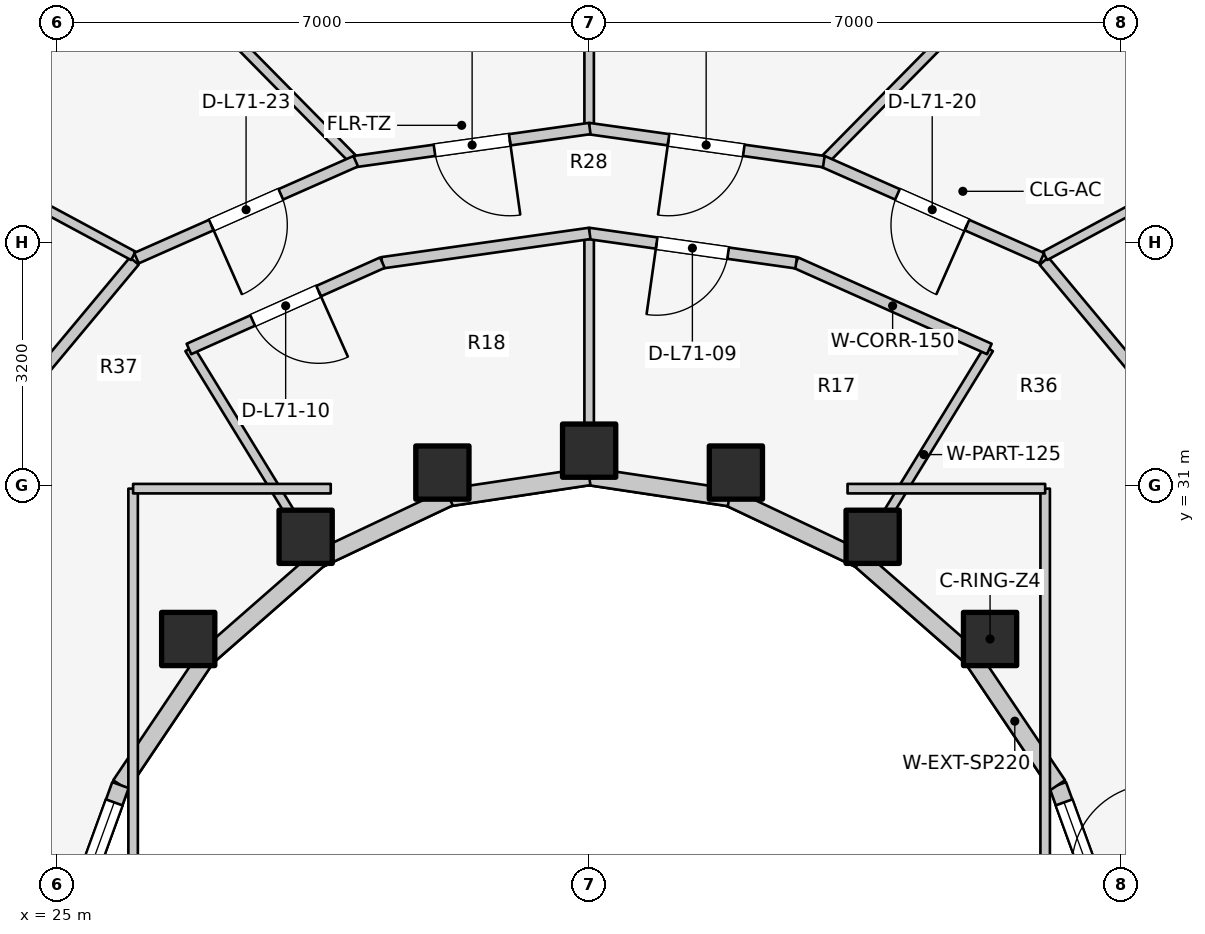
"""IFC4 building model, lengths in metres.
Left out: names, types, materials, properties, quantities, classifications, styles, units other than length and angle.
Written with IfcOpenShell. Run it as: python <this file> out.ifc"""

import sys

from ifc_helpers import new_model, si_unit, direction, frame, frame_2d, origin, origin_2d, place, context, subcontext, project, spatial, rectangle, extrude, element, fill, save


model = new_model("IFC4")
c1 = context("Model", 3, precision=1e-05, world=origin(), true_north=direction((0.0, 1.0)))
c2 = subcontext(c1, "Body", "Model", "MODEL_VIEW")
j1 = project(units=[si_unit("LENGTHUNIT", "METRE"), si_unit("PLANEANGLEUNIT", "RADIAN")], contexts=[c1])
p1 = place(None, origin())
s1 = spatial("IfcSite", under=j1, at=p1, CompositionType="ELEMENT")
p2 = place(p1, origin())
s2 = spatial("IfcBuilding", under=s1, at=p2, CompositionType="ELEMENT")
p3 = place(p2, frame((0.0, 0.0, 232.6)))
s3 = spatial("IfcBuildingStorey", under=s2, at=p3, CompositionType="ELEMENT", Elevation=232.6)
for number, where, z_axis, x_axis in (
    (1, (37.275, 28.982, 0.0), (0.0, 0.0, 1.0), (1.0, 0.0, 0.0)),
    (2, (35.73, 30.327, 0.0), (0.0, 0.0, 1.0), (1.0, 0.0, 0.0)),
    (3, (33.931, 31.172, 0.0), (0.0, 0.0, 1.0), (1.0, 0.0, 0.0)),
    (4, (32.0, 31.46, 0.0), (0.0, 0.0, 1.0), (1.0, 0.0, 0.0)),
    (5, (30.069, 31.172, 0.0), (0.0, 0.0, 1.0), (1.0, 0.0, 0.0)),
    (6, (28.27, 30.327, 0.0), (0.0, 0.0, 1.0), (1.0, 0.0, 0.0)),
    (7, (26.725, 28.982, 0.0), (0.0, 0.0, 1.0), (1.0, 0.0, 0.0)),
):
    element("IfcColumn", number, at=place(p3, frame(where, z_axis=z_axis, x_axis=x_axis)), inside=s3, PredefinedType="COLUMN", context=c2, shape_type="SweptSolid", body=[
        extrude(rectangle(XDim=0.7, YDim=0.7, at=origin_2d()), origin(), (0.0, 0.0, 1.0), 3.1),
    ])
p4 = place(p3, frame((38.877, 25.102, 0.0), z_axis=(0.0, 0.0, 1.0), x_axis=(-0.341423187295, 0.93990968033, 0.0)))
e8 = element("IfcWall", 8, at=p4, inside=s3, PredefinedType="STANDARD", context=c2, shape_type="SweptSolid", body=[
    extrude(rectangle(XDim=2.084, YDim=0.23, at=frame_2d((1.042, 0.0))), origin(), (0.0, 0.0, 1.0), 2.84),
])
p5 = place(p4, frame((0.242, 0.0, 0.85)))
e9 = element("IfcOpeningElement", 9, at=p5, cuts=e8, PredefinedType="OPENING", context=c2, shape_type="SweptSolid", body=[
    extrude(rectangle(XDim=1.6, YDim=1.65, at=frame_2d((0.8, 0.825))), frame((0.0, 0.125, 0.0), z_axis=(0.0, -1.0, 0.0), x_axis=(1.0, 0.0, 0.0)), (0.0, 0.0, 1.0), 0.25),
])
p6 = place(p3, frame((38.166, 27.06, 0.0), z_axis=(0.0, 0.0, 1.0), x_axis=(-0.558197800898, 0.829707909492, 0.0)))
e10 = element("IfcWall", 10, at=p6, inside=s3, PredefinedType="STANDARD", context=c2, shape_type="SweptSolid", body=[
    extrude(rectangle(XDim=2.027, YDim=0.23, at=frame_2d((1.013, 0.0))), origin(), (0.0, 0.0, 1.0), 2.16),
])
p7 = place(p3, frame((37.035, 28.742, 0.0), z_axis=(0.0, 0.0, 1.0), x_axis=(-0.752576694707, 0.658504607869, 0.0)))
e11 = element("IfcWall", 11, at=p7, inside=s3, PredefinedType="STANDARD", context=c2, shape_type="SweptSolid", body=[
    extrude(rectangle(XDim=1.959, YDim=0.23, at=frame_2d((0.98, 0.0))), origin(), (0.0, 0.0, 1.0), 2.16),
])
p8 = place(p3, frame((35.56, 30.032, 0.0), z_axis=(0.0, 0.0, 1.0), x_axis=(-0.904179699603, 0.427152280606, 0.0)))
e12 = element("IfcWall", 12, at=p8, inside=s3, PredefinedType="STANDARD", context=c2, shape_type="SweptSolid", body=[
    extrude(rectangle(XDim=1.899, YDim=0.23, at=frame_2d((0.95, 0.0))), origin(), (0.0, 0.0, 1.0), 2.16),
])
for number, where, z_axis, x_axis in (
    (13, (33.843, 30.843, 0.0), (0.0, 0.0, 1.0), (-0.989, 0.149, 0.0)),
    (14, (32.0, 31.12, 0.0), (0.0, 0.0, 1.0), (-0.989, -0.149, 0.0)),
):
    element("IfcWall", number, at=place(p3, frame(where, z_axis=z_axis, x_axis=x_axis)), inside=s3, PredefinedType="STANDARD", context=c2, shape_type="SweptSolid", body=[
        extrude(rectangle(XDim=1.864, YDim=0.23, at=frame_2d((0.932, 0.0))), origin(), (0.0, 0.0, 1.0), 2.16),
    ])
p9 = place(p3, frame((30.157, 30.843, 0.0), z_axis=(0.0, 0.0, 1.0), x_axis=(-0.904179699603, -0.427152280606, 0.0)))
e15 = element("IfcWall", 15, at=p9, inside=s3, PredefinedType="STANDARD", context=c2, shape_type="SweptSolid", body=[
    extrude(rectangle(XDim=1.899, YDim=0.23, at=frame_2d((0.95, 0.0))), origin(), (0.0, 0.0, 1.0), 2.16),
])
p10 = place(p3, frame((28.44, 30.032, 0.0), z_axis=(0.0, 0.0, 1.0), x_axis=(-0.752576694707, -0.658504607869, 0.0)))
e16 = element("IfcWall", 16, at=p10, inside=s3, PredefinedType="STANDARD", context=c2, shape_type="SweptSolid", body=[
    extrude(rectangle(XDim=1.959, YDim=0.23, at=frame_2d((0.98, 0.0))), origin(), (0.0, 0.0, 1.0), 2.16),
])
p11 = place(p3, frame((26.965, 28.742, 0.0), z_axis=(0.0, 0.0, 1.0), x_axis=(-0.558197800898, -0.829707909492, 0.0)))
e17 = element("IfcWall", 17, at=p11, inside=s3, PredefinedType="STANDARD", context=c2, shape_type="SweptSolid", body=[
    extrude(rectangle(XDim=2.027, YDim=0.23, at=frame_2d((1.013, 0.0))), origin(), (0.0, 0.0, 1.0), 2.16),
])
p12 = place(p3, frame((25.834, 27.06, 0.0), z_axis=(0.0, 0.0, 1.0), x_axis=(-0.341423187295, -0.93990968033, 0.0)))
e18 = element("IfcWall", 18, at=p12, inside=s3, PredefinedType="STANDARD", context=c2, shape_type="SweptSolid", body=[
    extrude(rectangle(XDim=2.084, YDim=0.23, at=frame_2d((1.042, 0.0))), origin(), (0.0, 0.0, 1.0), 2.84),
])
p13 = place(p12, frame((0.242, 0.0, 0.85)))
e19 = element("IfcOpeningElement", 19, at=p13, cuts=e18, PredefinedType="OPENING", context=c2, shape_type="SweptSolid", body=[
    extrude(rectangle(XDim=1.6, YDim=1.65, at=frame_2d((0.8, 0.825))), frame((0.0, 0.125, 0.0), z_axis=(0.0, -1.0, 0.0), x_axis=(1.0, 0.0, 0.0)), (0.0, 0.0, 1.0), 0.25),
])
p14 = place(p3, frame((35.55, 30.015, 0.0), z_axis=(0.0, 0.0, 1.0), x_axis=(0.522763432117, 0.852477796802, 0.0)))
e20 = element("IfcWall", 20, at=p14, inside=s3, PredefinedType="PARTITIONING", context=c2, shape_type="SweptSolid", body=[
    extrude(rectangle(XDim=3.269, YDim=0.125, at=frame_2d((1.635, 0.0))), origin(), (0.0, 0.0, 1.0), 2.376),
])
p15 = place(p3, frame((32.0, 31.1, 0.0), z_axis=(0.0, 0.0, 1.0), x_axis=(0.0, 1.0, 0.0)))
e21 = element("IfcWall", 21, at=p15, inside=s3, PredefinedType="PARTITIONING", context=c2, shape_type="SweptSolid", body=[
    extrude(rectangle(XDim=3.218, YDim=0.125, at=frame_2d((1.609, 0.0))), origin(), (0.0, 0.0, 1.0), 2.376),
])
p16 = place(p3, frame((28.45, 30.015, 0.0), z_axis=(0.0, 0.0, 1.0), x_axis=(-0.522763432117, 0.852477796802, 0.0)))
e22 = element("IfcWall", 22, at=p16, inside=s3, PredefinedType="PARTITIONING", context=c2, shape_type="SweptSolid", body=[
    extrude(rectangle(XDim=3.269, YDim=0.125, at=frame_2d((1.635, 0.0))), origin(), (0.0, 0.0, 1.0), 2.376),
])
p17 = place(p3, frame((37.265, 32.798, 0.0), z_axis=(0.0, 0.0, 1.0), x_axis=(-0.913254317828, 0.407389924971, 0.0)))
e23 = element("IfcWall", 23, at=p17, inside=s3, PredefinedType="PARTITIONING", context=c2, shape_type="SweptSolid", body=[
    extrude(rectangle(XDim=2.787, YDim=0.15, at=frame_2d((1.393, 0.0))), origin(), (0.0, 0.0, 1.0), 2.376),
])
p18 = place(p3, frame((34.724, 33.932, 0.0), z_axis=(0.0, 0.0, 1.0), x_axis=(-0.990150268487, 0.140008734782, 0.0)))
e24 = element("IfcWall", 24, at=p18, inside=s3, PredefinedType="PARTITIONING", context=c2, shape_type="SweptSolid", body=[
    extrude(rectangle(XDim=2.759, YDim=0.15, at=frame_2d((1.379, 0.0))), origin(), (0.0, 0.0, 1.0), 2.376),
])
p19 = place(p18, frame((0.904, 0.0, 0.0)))
e25 = element("IfcOpeningElement", 25, at=p19, cuts=e24, PredefinedType="OPENING", context=c2, shape_type="SweptSolid", body=[
    extrude(rectangle(XDim=0.95, YDim=2.1, at=frame_2d((0.475, 1.05))), frame((0.0, 0.085, 0.0), z_axis=(0.0, -1.0, 0.0), x_axis=(1.0, 0.0, 0.0)), (0.0, 0.0, 1.0), 0.17),
])
p20 = place(p3, frame((32.007, 34.318, 0.0), z_axis=(0.0, 0.0, 1.0), x_axis=(-0.990150268487, -0.140008734782, 0.0)))
e26 = element("IfcWall", 26, at=p20, inside=s3, PredefinedType="PARTITIONING", context=c2, shape_type="SweptSolid", body=[
    extrude(rectangle(XDim=2.759, YDim=0.15, at=frame_2d((1.379, 0.0))), origin(), (0.0, 0.0, 1.0), 2.376),
])
p21 = place(p3, frame((29.28, 33.933, 0.0), z_axis=(0.0, 0.0, 1.0), x_axis=(-0.913254317828, -0.407389924971, 0.0)))
e27 = element("IfcWall", 27, at=p21, inside=s3, PredefinedType="PARTITIONING", context=c2, shape_type="SweptSolid", body=[
    extrude(rectangle(XDim=2.787, YDim=0.15, at=frame_2d((1.393, 0.0))), origin(), (0.0, 0.0, 1.0), 2.376),
])
p22 = place(p21, frame((0.918, 0.0, 0.0)))
e28 = element("IfcOpeningElement", 28, at=p22, cuts=e27, PredefinedType="OPENING", context=c2, shape_type="SweptSolid", body=[
    extrude(rectangle(XDim=0.95, YDim=2.1, at=frame_2d((0.475, 1.05))), frame((0.0, 0.085, 0.0), z_axis=(0.0, -1.0, 0.0), x_axis=(1.0, 0.0, 0.0)), (0.0, 0.0, 1.0), 0.17),
])
p23 = place(p3, frame((26.0, 25.8, 0.0), z_axis=(0.0, 0.0, 1.0), x_axis=(0.0, 1.0, 0.0)))
e29 = element("IfcWall", 29, at=p23, inside=s3, PredefinedType="PARTITIONING", context=c2, shape_type="SweptSolid", body=[
    extrude(rectangle(XDim=5.16, YDim=0.125, at=frame_2d((2.58, 0.0))), origin(), (0.0, 0.0, 1.0), 2.232),
])
p24 = place(p3, frame((26.0, 30.96, 0.0), z_axis=(0.0, 0.0, 1.0), x_axis=(1.0, 0.0, 0.0)))
e30 = element("IfcWall", 30, at=p24, inside=s3, PredefinedType="PARTITIONING", context=c2, shape_type="SweptSolid", body=[
    extrude(rectangle(XDim=2.6, YDim=0.125, at=frame_2d((1.3, 0.0))), origin(), (0.0, 0.0, 1.0), 2.376),
])
p25 = place(p3, frame((38.0, 25.8, 0.0), z_axis=(0.0, 0.0, 1.0), x_axis=(0.0, 1.0, 0.0)))
e31 = element("IfcWall", 31, at=p25, inside=s3, PredefinedType="PARTITIONING", context=c2, shape_type="SweptSolid", body=[
    extrude(rectangle(XDim=5.16, YDim=0.125, at=frame_2d((2.58, 0.0))), origin(), (0.0, 0.0, 1.0), 2.232),
])
p26 = place(p3, frame((35.4, 30.96, 0.0), z_axis=(0.0, 0.0, 1.0), x_axis=(1.0, 0.0, 0.0)))
e32 = element("IfcWall", 32, at=p26, inside=s3, PredefinedType="PARTITIONING", context=c2, shape_type="SweptSolid", body=[
    extrude(rectangle(XDim=2.6, YDim=0.125, at=frame_2d((1.3, 0.0))), origin(), (0.0, 0.0, 1.0), 2.376),
])
for number, where, z_axis, x_axis in (
    (33, (37.984, 33.955, 0.0), (0.0, 0.0, 1.0), (0.64, -0.768, 0.0)),
    (34, (26.016, 33.955, 0.0), (0.0, 0.0, 1.0), (-0.64, -0.768, 0.0)),
):
    element("IfcWall", number, at=place(p3, frame(where, z_axis=z_axis, x_axis=x_axis)), inside=s3, PredefinedType="PARTITIONING", context=c2, shape_type="SweptSolid", body=[
        extrude(rectangle(XDim=2.21, YDim=0.15, at=frame_2d((1.105, 0.0))), origin(), (0.0, 0.0, 1.0), 2.376),
    ])
p27 = place(p3, frame((37.997, 34.023, 0.0), z_axis=(0.0, 0.0, 1.0), x_axis=(0.880531534665, 0.473987569943, 0.0)))
e35 = element("IfcWall", 35, at=p27, inside=s3, PredefinedType="PARTITIONING", context=c2, shape_type="SweptSolid", body=[
    extrude(rectangle(XDim=6.096, YDim=0.125, at=frame_2d((3.048, 0.0))), origin(), (0.0, 0.0, 1.0), 2.376),
])
p28 = place(p3, frame((35.118, 35.304, 0.0), z_axis=(0.0, 0.0, 1.0), x_axis=(0.702191571271, 0.711988059756, 0.0)))
e36 = element("IfcWall", 36, at=p28, inside=s3, PredefinedType="PARTITIONING", context=c2, shape_type="SweptSolid", body=[
    extrude(rectangle(XDim=5.184, YDim=0.125, at=frame_2d((2.592, 0.0))), origin(), (0.0, 0.0, 1.0), 2.376),
])
p29 = place(p3, frame((32.0, 35.753, 0.0), z_axis=(0.0, 0.0, 1.0), x_axis=(0.0, 1.0, 0.0)))
e37 = element("IfcWall", 37, at=p29, inside=s3, PredefinedType="PARTITIONING", context=c2, shape_type="SweptSolid", body=[
    extrude(rectangle(XDim=3.947, YDim=0.125, at=frame_2d((1.974, 0.0))), origin(), (0.0, 0.0, 1.0), 2.376),
])
p30 = place(p3, frame((28.882, 35.304, 0.0), z_axis=(0.0, 0.0, 1.0), x_axis=(-0.702191571271, 0.711988059756, 0.0)))
e38 = element("IfcWall", 38, at=p30, inside=s3, PredefinedType="PARTITIONING", context=c2, shape_type="SweptSolid", body=[
    extrude(rectangle(XDim=5.184, YDim=0.125, at=frame_2d((2.592, 0.0))), origin(), (0.0, 0.0, 1.0), 2.376),
])
p31 = place(p3, frame((26.003, 34.023, 0.0), z_axis=(0.0, 0.0, 1.0), x_axis=(-0.880531534665, 0.473987569943, 0.0)))
e39 = element("IfcWall", 39, at=p31, inside=s3, PredefinedType="PARTITIONING", context=c2, shape_type="SweptSolid", body=[
    extrude(rectangle(XDim=6.096, YDim=0.125, at=frame_2d((3.048, 0.0))), origin(), (0.0, 0.0, 1.0), 2.376),
])
p32 = place(p3, frame((37.956, 33.992, 0.0), z_axis=(0.0, 0.0, 1.0), x_axis=(-0.914642679993, 0.404263240891, 0.0)))
e40 = element("IfcWall", 40, at=p32, inside=s3, PredefinedType="PARTITIONING", context=c2, shape_type="SweptSolid", body=[
    extrude(rectangle(XDim=3.154, YDim=0.15, at=frame_2d((1.577, 0.0))), origin(), (0.0, 0.0, 1.0), 2.376),
])
p33 = place(p32, frame((1.077, 0.0, 0.0)))
e41 = element("IfcOpeningElement", 41, at=p33, cuts=e40, PredefinedType="OPENING", context=c2, shape_type="SweptSolid", body=[
    extrude(rectangle(XDim=1.0, YDim=2.1, at=frame_2d((0.5, 1.05))), frame((0.0, 0.085, 0.0), z_axis=(0.0, -1.0, 0.0), x_axis=(1.0, 0.0, 0.0)), (0.0, 0.0, 1.0), 0.17),
])
p34 = place(p3, frame((35.087, 35.263, 0.0), z_axis=(0.0, 0.0, 1.0), x_axis=(-0.990268690673, 0.139168675614, 0.0)))
e42 = element("IfcWall", 42, at=p34, inside=s3, PredefinedType="PARTITIONING", context=c2, shape_type="SweptSolid", body=[
    extrude(rectangle(XDim=3.126, YDim=0.15, at=frame_2d((1.563, 0.0))), origin(), (0.0, 0.0, 1.0), 2.376),
])
p35 = place(p34, frame((1.063, 0.0, 0.0)))
e43 = element("IfcOpeningElement", 43, at=p35, cuts=e42, PredefinedType="OPENING", context=c2, shape_type="SweptSolid", body=[
    extrude(rectangle(XDim=1.0, YDim=2.1, at=frame_2d((0.5, 1.05))), frame((0.0, 0.085, 0.0), z_axis=(0.0, -1.0, 0.0), x_axis=(1.0, 0.0, 0.0)), (0.0, 0.0, 1.0), 0.17),
])
p36 = place(p3, frame((32.008, 35.698, 0.0), z_axis=(0.0, 0.0, 1.0), x_axis=(-0.990268690673, -0.139168675614, 0.0)))
e44 = element("IfcWall", 44, at=p36, inside=s3, PredefinedType="PARTITIONING", context=c2, shape_type="SweptSolid", body=[
    extrude(rectangle(XDim=3.126, YDim=0.15, at=frame_2d((1.563, 0.0))), origin(), (0.0, 0.0, 1.0), 2.376),
])
p37 = place(p36, frame((1.063, 0.0, 0.0)))
e45 = element("IfcOpeningElement", 45, at=p37, cuts=e44, PredefinedType="OPENING", context=c2, shape_type="SweptSolid", body=[
    extrude(rectangle(XDim=1.0, YDim=2.1, at=frame_2d((0.5, 1.05))), frame((0.0, 0.085, 0.0), z_axis=(0.0, -1.0, 0.0), x_axis=(1.0, 0.0, 0.0)), (0.0, 0.0, 1.0), 0.17),
])
p38 = place(p3, frame((28.929, 35.268, 0.0), z_axis=(0.0, 0.0, 1.0), x_axis=(-0.914642679993, -0.404263240891, 0.0)))
e46 = element("IfcWall", 46, at=p38, inside=s3, PredefinedType="PARTITIONING", context=c2, shape_type="SweptSolid", body=[
    extrude(rectangle(XDim=3.154, YDim=0.15, at=frame_2d((1.577, 0.0))), origin(), (0.0, 0.0, 1.0), 2.376),
])
p39 = place(p38, frame((1.077, 0.0, 0.0)))
e47 = element("IfcOpeningElement", 47, at=p39, cuts=e46, PredefinedType="OPENING", context=c2, shape_type="SweptSolid", body=[
    extrude(rectangle(XDim=1.0, YDim=2.1, at=frame_2d((0.5, 1.05))), frame((0.0, 0.085, 0.0), z_axis=(0.0, -1.0, 0.0), x_axis=(1.0, 0.0, 0.0)), (0.0, 0.0, 1.0), 0.17),
])
p40 = place(p5, origin())
e48 = element("IfcWindow", 48, at=p40, inside=s3, PartitioningType="SINGLE_PANEL", PredefinedType="WINDOW", context=c2, shape_type="SweptSolid", body=[
    extrude(rectangle(XDim=1.6, YDim=1.65, at=frame_2d((0.8, 0.825))), frame((0.0, 0.03, 0.0), z_axis=(0.0, -1.0, 0.0), x_axis=(1.0, 0.0, 0.0)), (0.0, 0.0, 1.0), 0.06),
])
fill(e9, e48)
p41 = place(p13, origin())
e49 = element("IfcWindow", 49, at=p41, inside=s3, PartitioningType="SINGLE_PANEL", PredefinedType="WINDOW", context=c2, shape_type="SweptSolid", body=[
    extrude(rectangle(XDim=1.6, YDim=1.65, at=frame_2d((0.8, 0.825))), frame((0.0, 0.03, 0.0), z_axis=(0.0, -1.0, 0.0), x_axis=(1.0, 0.0, 0.0)), (0.0, 0.0, 1.0), 0.06),
])
fill(e19, e49)
p42 = place(p19, origin())
e50 = element("IfcDoor", 50, at=p42, inside=s3, OperationType="SINGLE_SWING_RIGHT", PredefinedType="DOOR", context=c2, shape_type="SweptSolid", body=[
    extrude(rectangle(XDim=0.95, YDim=2.1, at=frame_2d((0.475, 1.05))), frame((0.0, 0.025, 0.0), z_axis=(0.0, -1.0, 0.0), x_axis=(1.0, 0.0, 0.0)), (0.0, 0.0, 1.0), 0.05),
])
fill(e25, e50)
p43 = place(p22, origin())
e51 = element("IfcDoor", 51, at=p43, inside=s3, OperationType="SINGLE_SWING_LEFT", PredefinedType="DOOR", context=c2, shape_type="SweptSolid", body=[
    extrude(rectangle(XDim=0.95, YDim=2.1, at=frame_2d((0.475, 1.05))), frame((0.0, 0.025, 0.0), z_axis=(0.0, -1.0, 0.0), x_axis=(1.0, 0.0, 0.0)), (0.0, 0.0, 1.0), 0.05),
])
fill(e28, e51)
p44 = place(p33, origin())
e52 = element("IfcDoor", 52, at=p44, inside=s3, OperationType="SINGLE_SWING_LEFT", PredefinedType="DOOR", context=c2, shape_type="SweptSolid", body=[
    extrude(rectangle(XDim=1.0, YDim=2.1, at=frame_2d((0.5, 1.05))), frame((0.0, 0.025, 0.0), z_axis=(0.0, -1.0, 0.0), x_axis=(1.0, 0.0, 0.0)), (0.0, 0.0, 1.0), 0.05),
])
fill(e41, e52)
p45 = place(p35, origin())
e53 = element("IfcDoor", 53, at=p45, inside=s3, OperationType="SINGLE_SWING_RIGHT", PredefinedType="DOOR", context=c2, shape_type="SweptSolid", body=[
    extrude(rectangle(XDim=1.0, YDim=2.1, at=frame_2d((0.5, 1.05))), frame((0.0, 0.025, 0.0), z_axis=(0.0, -1.0, 0.0), x_axis=(1.0, 0.0, 0.0)), (0.0, 0.0, 1.0), 0.05),
])
fill(e43, e53)
p46 = place(p37, origin())
e54 = element("IfcDoor", 54, at=p46, inside=s3, OperationType="SINGLE_SWING_LEFT", PredefinedType="DOOR", context=c2, shape_type="SweptSolid", body=[
    extrude(rectangle(XDim=1.0, YDim=2.1, at=frame_2d((0.5, 1.05))), frame((0.0, 0.025, 0.0), z_axis=(0.0, -1.0, 0.0), x_axis=(1.0, 0.0, 0.0)), (0.0, 0.0, 1.0), 0.05),
])
fill(e45, e54)
p47 = place(p39, origin())
e55 = element("IfcDoor", 55, at=p47, inside=s3, OperationType="SINGLE_SWING_RIGHT", PredefinedType="DOOR", context=c2, shape_type="SweptSolid", body=[
    extrude(rectangle(XDim=1.0, YDim=2.1, at=frame_2d((0.5, 1.05))), frame((0.0, 0.025, 0.0), z_axis=(0.0, -1.0, 0.0), x_axis=(1.0, 0.0, 0.0)), (0.0, 0.0, 1.0), 0.05),
])
fill(e47, e55)
save(model, sys.argv[1])
